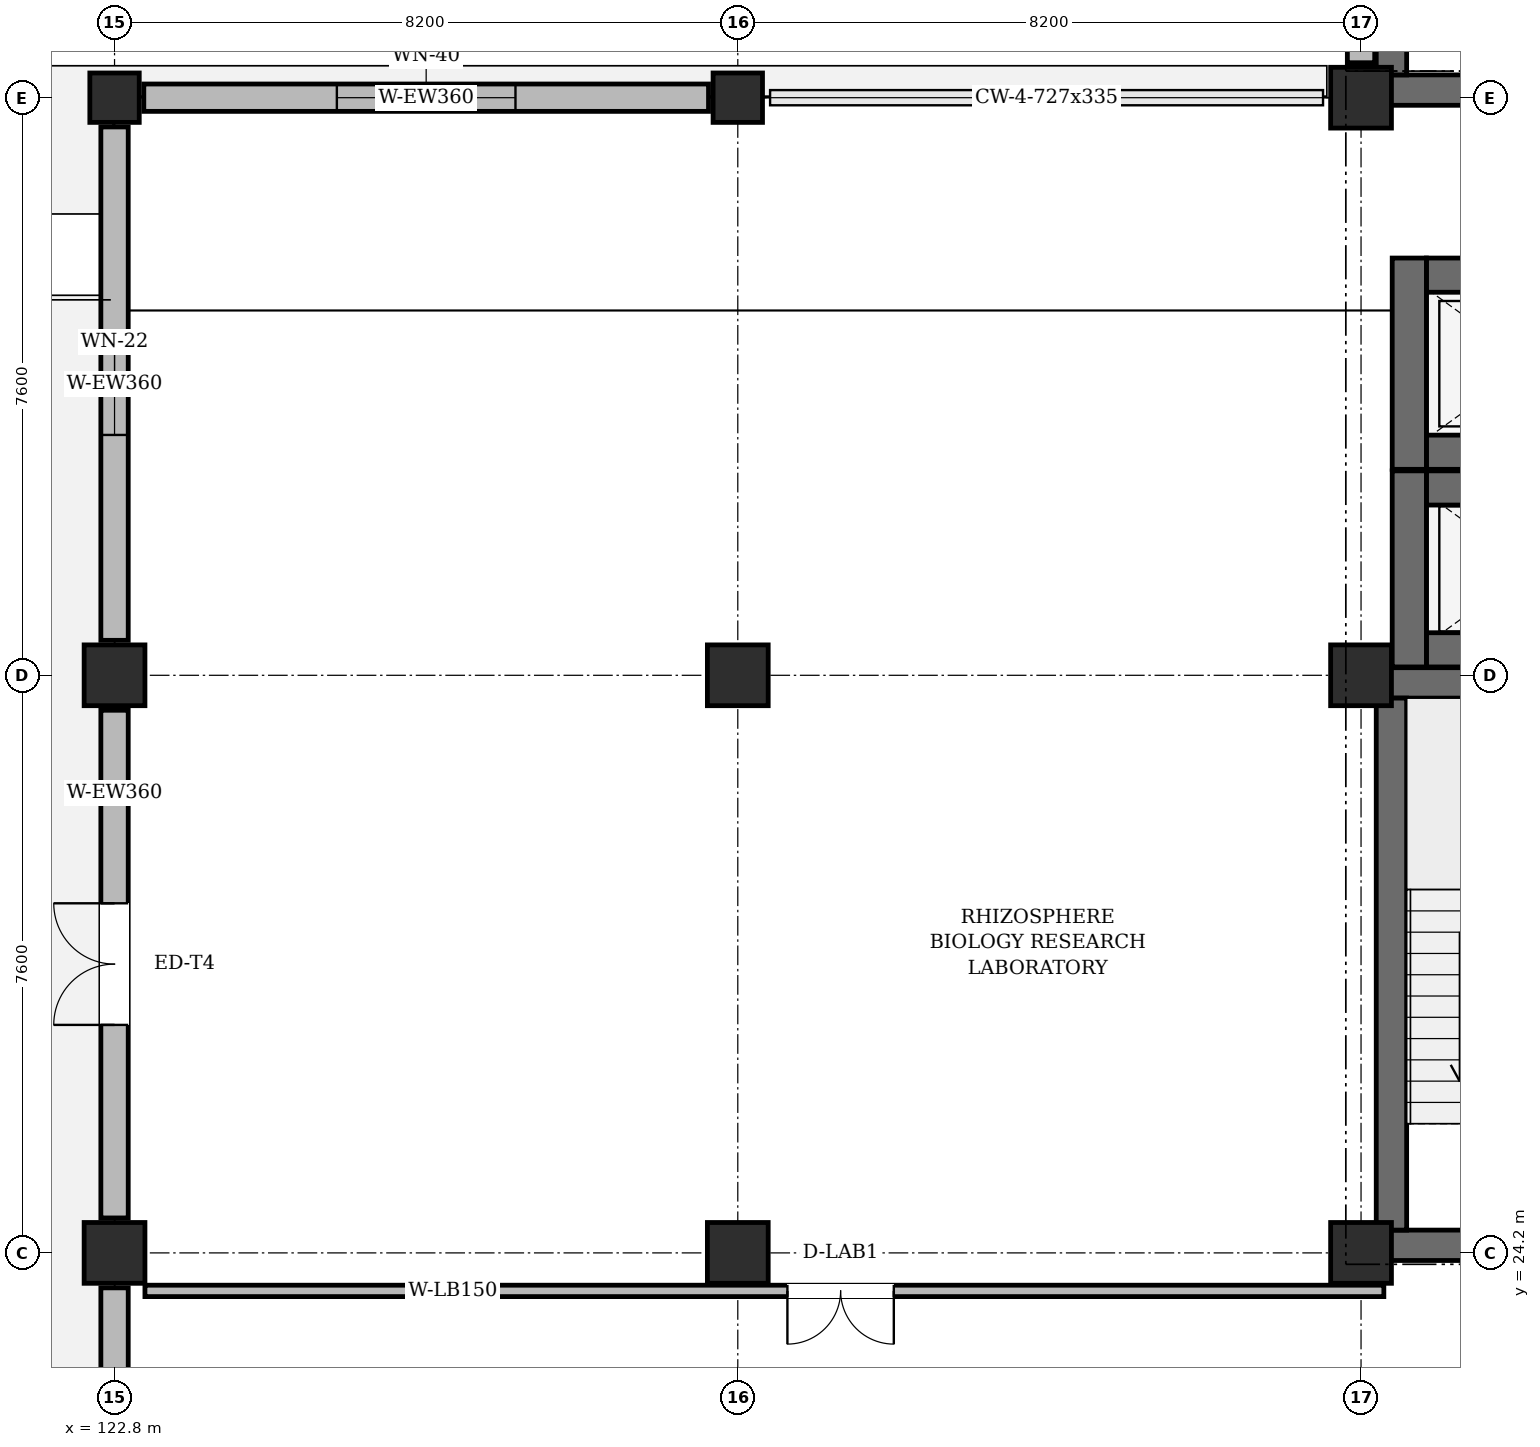
"""IFC4 building model, lengths in metres.
Left out: names, types, materials, properties, quantities, classifications, styles, units other than length and angle.
Written with IfcOpenShell. Run it as: python <this file> out.ifc"""

import sys

from ifc_helpers import new_model, si_unit, direction, frame, frame_2d, origin, origin_2d, place, context, subcontext, project, spatial, rectangle, extrude, element, fill, save


model = new_model("IFC4")
c1 = context("Model", 3, precision=1e-05, world=origin(), true_north=direction((0.0, 1.0)))
c2 = subcontext(c1, "Body", "Model", "MODEL_VIEW")
j1 = project(units=[si_unit("LENGTHUNIT", "METRE"), si_unit("PLANEANGLEUNIT", "RADIAN")], contexts=[c1])
p1 = place(None, origin())
s1 = spatial("IfcSite", under=j1, at=p1, CompositionType="ELEMENT")
p2 = place(p1, origin())
s2 = spatial("IfcBuilding", under=s1, at=p2, CompositionType="ELEMENT")
p3 = place(p2, frame((0.0, 0.0, 36.6)))
s3 = spatial("IfcBuildingStorey", under=s2, at=p3, CompositionType="ELEMENT", Elevation=36.6)
for number, where, z_axis, x_axis in (
    (1, (122.8, 24.2, 0.0), (0.0, 0.0, 1.0), (1.0, 0.0, 0.0)),
    (2, (122.8, 31.8, 0.0), (0.0, 0.0, 1.0), (1.0, 0.0, 0.0)),
):
    element("IfcColumn", number, at=place(p3, frame(where, z_axis=z_axis, x_axis=x_axis)), inside=s3, PredefinedType="COLUMN", context=c2, shape_type="SweptSolid", body=[
        extrude(rectangle(XDim=0.8, YDim=0.8, at=origin_2d()), origin(), (0.0, 0.0, 1.0), 3.95),
    ])
p4 = place(p3, frame((122.8, 39.4, 0.0), z_axis=(0.0, 0.0, 1.0), x_axis=(1.0, 0.0, 0.0)))
e3 = element("IfcColumn", 3, at=p4, inside=s3, PredefinedType="COLUMN", context=c2, shape_type="SweptSolid", body=[
    extrude(rectangle(XDim=0.65, YDim=0.65, at=origin_2d()), origin(), (0.0, 0.0, 1.0), 3.95),
])
for number, where, z_axis, x_axis in (
    (4, (131.0, 24.2, 0.0), (0.0, 0.0, 1.0), (1.0, 0.0, 0.0)),
    (5, (131.0, 31.8, 0.0), (0.0, 0.0, 1.0), (1.0, 0.0, 0.0)),
):
    element("IfcColumn", number, at=place(p3, frame(where, z_axis=z_axis, x_axis=x_axis)), inside=s3, PredefinedType="COLUMN", context=c2, shape_type="SweptSolid", body=[
        extrude(rectangle(XDim=0.8, YDim=0.8, at=origin_2d()), origin(), (0.0, 0.0, 1.0), 3.95),
    ])
p5 = place(p3, frame((131.0, 39.4, 0.0), z_axis=(0.0, 0.0, 1.0), x_axis=(1.0, 0.0, 0.0)))
e6 = element("IfcColumn", 6, at=p5, inside=s3, PredefinedType="COLUMN", context=c2, shape_type="SweptSolid", body=[
    extrude(rectangle(XDim=0.65, YDim=0.65, at=origin_2d()), origin(), (0.0, 0.0, 1.0), 3.95),
])
for number, where, z_axis, x_axis in (
    (7, (139.2, 24.2, 0.0), (0.0, 0.0, 1.0), (1.0, 0.0, 0.0)),
    (8, (139.2, 31.8, 0.0), (0.0, 0.0, 1.0), (1.0, 0.0, 0.0)),
    (9, (139.2, 39.4, 0.0), (0.0, 0.0, 1.0), (1.0, 0.0, 0.0)),
):
    element("IfcColumn", number, at=place(p3, frame(where, z_axis=z_axis, x_axis=x_axis)), inside=s3, PredefinedType="COLUMN", context=c2, shape_type="SweptSolid", body=[
        extrude(rectangle(XDim=0.8, YDim=0.8, at=origin_2d()), origin(), (0.0, 0.0, 1.0), 3.95),
    ])
p6 = place(p3, frame((139.2, 46.54, 0.0), z_axis=(0.0, 0.0, 1.0), x_axis=(0.0, -1.0, 0.0)))
e10 = element("IfcWall", 10, at=p6, inside=s3, PredefinedType="SOLIDWALL", context=c2, shape_type="SweptSolid", body=[
    extrude(rectangle(XDim=6.68, YDim=0.36, at=frame_2d((3.34, 0.0))), origin(), (0.0, 0.0, 1.0), 3.335),
])
p7 = place(p3, frame((130.615, 39.4, 0.0), z_axis=(0.0, 0.0, 1.0), x_axis=(-1.0, 0.0, 0.0)))
e11 = element("IfcWall", 11, at=p7, inside=s3, PredefinedType="SOLIDWALL", context=c2, shape_type="SweptSolid", body=[
    extrude(rectangle(XDim=7.43, YDim=0.36, at=frame_2d((3.715, 0.0))), origin(), (0.0, 0.0, 1.0), 3.335),
])
p8 = place(p7, frame((2.54, 0.0, 0.95)))
e12 = element("IfcOpeningElement", 12, at=p8, cuts=e11, PredefinedType="OPENING", context=c2, shape_type="SweptSolid", body=[
    extrude(rectangle(XDim=2.35, YDim=2.05, at=frame_2d((1.175, 1.025))), frame((0.0, 0.192, 0.0), z_axis=(0.0, -1.0, 0.0), x_axis=(1.0, 0.0, 0.0)), (0.0, 0.0, 1.0), 0.384),
])
p9 = place(p3, frame((122.8, 39.015, 0.0), z_axis=(0.0, 0.0, 1.0), x_axis=(0.0, -1.0, 0.0)))
e13 = element("IfcWall", 13, at=p9, inside=s3, PredefinedType="SOLIDWALL", context=c2, shape_type="SweptSolid", body=[
    extrude(rectangle(XDim=6.755, YDim=0.36, at=frame_2d((3.377, 0.0))), origin(), (0.0, 0.0, 1.0), 3.335),
])
p10 = place(p9, frame((2.702, 0.0, 0.95)))
e14 = element("IfcOpeningElement", 14, at=p10, cuts=e13, PredefinedType="OPENING", context=c2, shape_type="SweptSolid", body=[
    extrude(rectangle(XDim=1.35, YDim=1.5, at=frame_2d((0.675, 0.75))), frame((0.0, 0.192, 0.0), z_axis=(0.0, -1.0, 0.0), x_axis=(1.0, 0.0, 0.0)), (0.0, 0.0, 1.0), 0.384),
])
p11 = place(p3, frame((122.8, 31.34, 0.0), z_axis=(0.0, 0.0, 1.0), x_axis=(0.0, -1.0, 0.0)))
e15 = element("IfcWall", 15, at=p11, inside=s3, PredefinedType="SOLIDWALL", context=c2, shape_type="SweptSolid", body=[
    extrude(rectangle(XDim=6.68, YDim=0.36, at=frame_2d((3.34, 0.0))), origin(), (0.0, 0.0, 1.0), 3.335),
])
p12 = place(p11, frame((2.54, 0.0, 0.0)))
e16 = element("IfcOpeningElement", 16, at=p12, cuts=e15, PredefinedType="OPENING", context=c2, shape_type="SweptSolid", body=[
    extrude(rectangle(XDim=1.6, YDim=2.2, at=frame_2d((0.8, 1.1))), frame((0.0, 0.192, 0.0), z_axis=(0.0, -1.0, 0.0), x_axis=(1.0, 0.0, 0.0)), (0.0, 0.0, 1.0), 0.384),
])
p13 = place(p3, frame((122.8, 23.74, 0.0), z_axis=(0.0, 0.0, 1.0), x_axis=(0.0, -1.0, 0.0)))
e17 = element("IfcWall", 17, at=p13, inside=s3, PredefinedType="SOLIDWALL", context=c2, shape_type="SweptSolid", body=[
    extrude(rectangle(XDim=6.68, YDim=0.36, at=frame_2d((3.34, 0.0))), origin(), (0.0, 0.0, 1.0), 3.335),
])
p14 = place(p13, frame((2.565, 0.0, 0.95)))
e18 = element("IfcOpeningElement", 18, at=p14, cuts=e17, PredefinedType="OPENING", context=c2, shape_type="SweptSolid", body=[
    extrude(rectangle(XDim=1.55, YDim=2.05, at=frame_2d((0.775, 1.025))), frame((0.0, 0.192, 0.0), z_axis=(0.0, -1.0, 0.0), x_axis=(1.0, 0.0, 0.0)), (0.0, 0.0, 1.0), 0.384),
])
p15 = place(p3, frame((139.4, 24.3, 0.0), z_axis=(0.0, 0.0, 1.0), x_axis=(1.0, 0.0, 0.0)))
e19 = element("IfcWall", 19, at=p15, inside=s3, PredefinedType="SHEAR", context=c2, shape_type="SweptSolid", body=[
    extrude(rectangle(XDim=3.8, YDim=0.4, at=frame_2d((1.9, 0.0))), origin(), (0.0, 0.0, 1.0), 3.95),
])
p16 = place(p15, frame((1.3, 0.0, 0.0)))
e20 = element("IfcOpeningElement", 20, at=p16, cuts=e19, PredefinedType="OPENING", context=c2, shape_type="SweptSolid", body=[
    extrude(rectangle(XDim=1.2, YDim=2.2, at=frame_2d((0.6, 1.1))), frame((0.0, 0.212, 0.0), z_axis=(0.0, -1.0, 0.0), x_axis=(1.0, 0.0, 0.0)), (0.0, 0.0, 1.0), 0.424),
])
p17 = place(p3, frame((139.4, 31.7, 0.0), z_axis=(0.0, 0.0, 1.0), x_axis=(1.0, 0.0, 0.0)))
e21 = element("IfcWall", 21, at=p17, inside=s3, PredefinedType="SHEAR", context=c2, shape_type="SweptSolid", body=[
    extrude(rectangle(XDim=3.8, YDim=0.4, at=frame_2d((1.9, 0.0))), origin(), (0.0, 0.0, 1.0), 3.95),
])
p18 = place(p3, frame((139.6, 24.5, 0.0), z_axis=(0.0, 0.0, 1.0), x_axis=(0.0, 1.0, 0.0)))
e22 = element("IfcWall", 22, at=p18, inside=s3, PredefinedType="SHEAR", context=c2, shape_type="SweptSolid", body=[
    extrude(rectangle(XDim=7.0, YDim=0.4, at=frame_2d((3.5, 0.0))), origin(), (0.0, 0.0, 1.0), 3.95),
])
p19 = place(p3, frame((139.4, 39.5, 0.0), z_axis=(0.0, 0.0, 1.0), x_axis=(1.0, 0.0, 0.0)))
e23 = element("IfcWall", 23, at=p19, inside=s3, PredefinedType="SHEAR", context=c2, shape_type="SweptSolid", body=[
    extrude(rectangle(XDim=3.8, YDim=0.4, at=frame_2d((1.9, 0.0))), origin(), (0.0, 0.0, 1.0), 3.95),
])
p20 = place(p19, frame((1.3, 0.0, 0.0)))
e24 = element("IfcOpeningElement", 24, at=p20, cuts=e23, PredefinedType="OPENING", context=c2, shape_type="SweptSolid", body=[
    extrude(rectangle(XDim=1.2, YDim=2.2, at=frame_2d((0.6, 1.1))), frame((0.0, 0.212, 0.0), z_axis=(0.0, -1.0, 0.0), x_axis=(1.0, 0.0, 0.0)), (0.0, 0.0, 1.0), 0.424),
])
p21 = place(p3, frame((139.6, 39.7, 0.0), z_axis=(0.0, 0.0, 1.0), x_axis=(0.0, 1.0, 0.0)))
e25 = element("IfcWall", 25, at=p21, inside=s3, PredefinedType="SHEAR", context=c2, shape_type="SweptSolid", body=[
    extrude(rectangle(XDim=7.0, YDim=0.4, at=frame_2d((3.5, 0.0))), origin(), (0.0, 0.0, 1.0), 3.95),
])
for number, where, z_axis, x_axis in (
    (26, (140.06, 32.135, 0.0), (0.0, 0.0, 1.0), (1.0, 0.0, 0.0)),
    (27, (140.06, 34.265, 0.0), (0.0, 0.0, 1.0), (1.0, 0.0, 0.0)),
):
    element("IfcWall", number, at=place(p3, frame(where, z_axis=z_axis, x_axis=x_axis)), inside=s3, PredefinedType="SHEAR", context=c2, shape_type="SweptSolid", body=[
        extrude(rectangle(XDim=2.74, YDim=0.45, at=frame_2d((1.37, 0.0))), origin(), (0.0, 0.0, 1.0), 3.95),
    ])
p22 = place(p3, frame((139.835, 31.91, 0.0), z_axis=(0.0, 0.0, 1.0), x_axis=(0.0, 1.0, 0.0)))
e28 = element("IfcWall", 28, at=p22, inside=s3, PredefinedType="SHEAR", context=c2, shape_type="SweptSolid", body=[
    extrude(rectangle(XDim=2.58, YDim=0.45, at=frame_2d((1.29, 0.0))), origin(), (0.0, 0.0, 1.0), 3.95),
])
for number, where, z_axis, x_axis in (
    (29, (140.06, 34.735, 0.0), (0.0, 0.0, 1.0), (1.0, 0.0, 0.0)),
    (30, (140.06, 37.065, 0.0), (0.0, 0.0, 1.0), (1.0, 0.0, 0.0)),
):
    element("IfcWall", number, at=place(p3, frame(where, z_axis=z_axis, x_axis=x_axis)), inside=s3, PredefinedType="SHEAR", context=c2, shape_type="SweptSolid", body=[
        extrude(rectangle(XDim=2.74, YDim=0.45, at=frame_2d((1.37, 0.0))), origin(), (0.0, 0.0, 1.0), 3.95),
    ])
p23 = place(p3, frame((139.835, 34.51, 0.0), z_axis=(0.0, 0.0, 1.0), x_axis=(0.0, 1.0, 0.0)))
e31 = element("IfcWall", 31, at=p23, inside=s3, PredefinedType="SHEAR", context=c2, shape_type="SweptSolid", body=[
    extrude(rectangle(XDim=2.78, YDim=0.45, at=frame_2d((1.39, 0.0))), origin(), (0.0, 0.0, 1.0), 3.95),
])
p24 = place(p3, frame((123.2, 23.7, 0.0), z_axis=(0.0, 0.0, 1.0), x_axis=(1.0, 0.0, 0.0)))
e32 = element("IfcWall", 32, at=p24, inside=s3, PredefinedType="PARTITIONING", context=c2, shape_type="SweptSolid", body=[
    extrude(rectangle(XDim=16.3, YDim=0.15, at=frame_2d((8.15, 0.0))), origin(), (0.0, 0.0, 1.0), 3.805),
])
p25 = place(p24, frame((8.453, 0.0, 0.0)))
e33 = element("IfcOpeningElement", 33, at=p25, cuts=e32, PredefinedType="OPENING", context=c2, shape_type="SweptSolid", body=[
    extrude(rectangle(XDim=1.4, YDim=2.2, at=frame_2d((0.7, 1.1))), frame((0.0, 0.087, 0.0), z_axis=(0.0, -1.0, 0.0), x_axis=(1.0, 0.0, 0.0)), (0.0, 0.0, 1.0), 0.174),
])
p26 = place(p8, origin())
e34 = element("IfcWindow", 34, at=p26, inside=s3, PartitioningType="DOUBLE_PANEL_VERTICAL", PredefinedType="WINDOW", context=c2, shape_type="SweptSolid", body=[
    extrude(rectangle(XDim=2.35, YDim=2.05, at=frame_2d((1.175, 1.025))), frame((0.0, 0.03, 0.0), z_axis=(0.0, -1.0, 0.0), x_axis=(1.0, 0.0, 0.0)), (0.0, 0.0, 1.0), 0.06),
])
fill(e12, e34)
p27 = place(p10, origin())
e35 = element("IfcWindow", 35, at=p27, inside=s3, PartitioningType="SINGLE_PANEL", PredefinedType="WINDOW", context=c2, shape_type="SweptSolid", body=[
    extrude(rectangle(XDim=1.35, YDim=1.5, at=frame_2d((0.675, 0.75))), frame((0.0, 0.03, 0.0), z_axis=(0.0, -1.0, 0.0), x_axis=(1.0, 0.0, 0.0)), (0.0, 0.0, 1.0), 0.06),
])
fill(e14, e35)
p28 = place(p12, frame((1.6, 0.0, 0.0), z_axis=(0.0, 0.0, 1.0), x_axis=(-1.0, 0.0, 0.0)))
e36 = element("IfcDoor", 36, at=p28, inside=s3, OperationType="DOUBLE_DOOR_SINGLE_SWING", PredefinedType="DOOR", context=c2, shape_type="SweptSolid", body=[
    extrude(rectangle(XDim=1.6, YDim=2.2, at=frame_2d((0.8, 1.1))), frame((0.0, 0.025, 0.0), z_axis=(0.0, -1.0, 0.0), x_axis=(1.0, 0.0, 0.0)), (0.0, 0.0, 1.0), 0.05),
])
fill(e16, e36)
p29 = place(p25, frame((1.4, 0.0, 0.0), z_axis=(0.0, 0.0, 1.0), x_axis=(-1.0, 0.0, 0.0)))
e37 = element("IfcDoor", 37, at=p29, inside=s3, OperationType="DOUBLE_DOOR_SINGLE_SWING", PredefinedType="DOOR", context=c2, shape_type="SweptSolid", body=[
    extrude(rectangle(XDim=1.4, YDim=2.2, at=frame_2d((0.7, 1.1))), frame((0.0, 0.025, 0.0), z_axis=(0.0, -1.0, 0.0), x_axis=(1.0, 0.0, 0.0)), (0.0, 0.0, 1.0), 0.05),
])
fill(e33, e37)
save(model, sys.argv[1])
